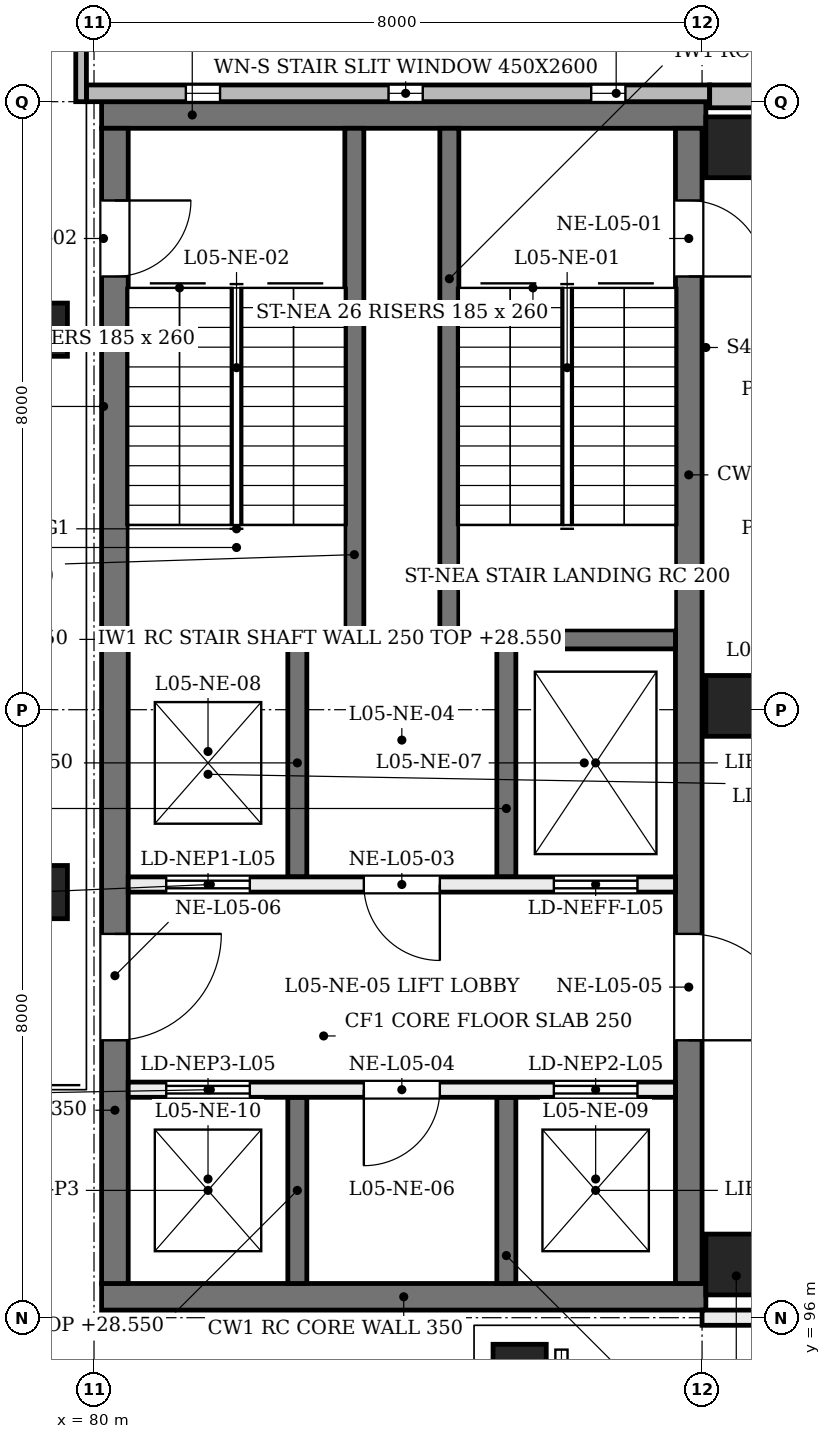
"""IFC4 building model, lengths in metres.
Left out: names, types, materials, properties, quantities, classifications, styles, units other than length and angle.
Written with IfcOpenShell. Run it as: python <this file> out.ifc"""

import sys

from ifc_helpers import new_model, si_unit, direction, frame, frame_2d, origin, origin_2d, place, context, subcontext, project, spatial, rectangle, extrude, element, fill, save


model = new_model("IFC4")
c1 = context("Model", 3, precision=1e-05, world=origin(), true_north=direction((0.0, 1.0)))
c2 = subcontext(c1, "Body", "Model", "MODEL_VIEW")
j1 = project(units=[si_unit("LENGTHUNIT", "METRE"), si_unit("PLANEANGLEUNIT", "RADIAN")], contexts=[c1])
p1 = place(None, origin())
s1 = spatial("IfcSite", under=j1, at=p1, CompositionType="ELEMENT")
p2 = place(p1, origin())
s2 = spatial("IfcBuilding", under=s1, at=p2, CompositionType="ELEMENT")
p3 = place(p2, frame((0.0, 0.0, 24.0)))
s3 = spatial("IfcBuildingStorey", under=s2, at=p3, CompositionType="ELEMENT", Elevation=24.0)
for number, where, z_axis, x_axis in (
    (1, (80.1, 96.275, 0.0), (0.0, 0.0, 1.0), (1.0, 0.0, 0.0)),
    (2, (80.1, 111.825, 0.0), (0.0, 0.0, 1.0), (1.0, 0.0, 0.0)),
):
    element("IfcWall", number, at=place(p3, frame(where, z_axis=z_axis, x_axis=x_axis)), inside=s3, PredefinedType="SHEAR", context=c2, shape_type="SweptSolid", body=[
        extrude(rectangle(XDim=7.95, YDim=0.35, at=frame_2d((3.975, 0.0))), origin(), (0.0, 0.0, 1.0), 4.58),
    ])
p4 = place(p3, frame((80.275, 96.45, 0.0), z_axis=(0.0, 0.0, 1.0), x_axis=(0.0, 1.0, 0.0)))
e3 = element("IfcWall", 3, at=p4, inside=s3, PredefinedType="SHEAR", context=c2, shape_type="SweptSolid", body=[
    extrude(rectangle(XDim=15.2, YDim=0.35, at=frame_2d((7.6, 0.0))), origin(), (0.0, 0.0, 1.0), 4.58),
])
p5 = place(p4, frame((13.25, 0.0, 0.0)))
e4 = element("IfcOpeningElement", 4, at=p5, cuts=e3, PredefinedType="OPENING", context=c2, shape_type="SweptSolid", body=[
    extrude(rectangle(XDim=1.0, YDim=2.1, at=frame_2d((0.5, 1.05))), frame((0.0, 0.185, 0.0), z_axis=(0.0, -1.0, 0.0), x_axis=(1.0, 0.0, 0.0)), (0.0, 0.0, 1.0), 0.37),
])
p6 = place(p4, frame((3.2, 0.0, 0.0)))
e5 = element("IfcOpeningElement", 5, at=p6, cuts=e3, PredefinedType="OPENING", context=c2, shape_type="SweptSolid", body=[
    extrude(rectangle(XDim=1.4, YDim=2.1, at=frame_2d((0.7, 1.05))), frame((0.0, 0.185, 0.0), z_axis=(0.0, -1.0, 0.0), x_axis=(1.0, 0.0, 0.0)), (0.0, 0.0, 1.0), 0.37),
])
p7 = place(p3, frame((87.825, 96.45, 0.0), z_axis=(0.0, 0.0, 1.0), x_axis=(0.0, 1.0, 0.0)))
e6 = element("IfcWall", 6, at=p7, inside=s3, PredefinedType="SHEAR", context=c2, shape_type="SweptSolid", body=[
    extrude(rectangle(XDim=15.2, YDim=0.35, at=frame_2d((7.6, 0.0))), origin(), (0.0, 0.0, 1.0), 4.58),
])
p8 = place(p7, frame((13.25, 0.0, 0.0)))
e7 = element("IfcOpeningElement", 7, at=p8, cuts=e6, PredefinedType="OPENING", context=c2, shape_type="SweptSolid", body=[
    extrude(rectangle(XDim=1.0, YDim=2.1, at=frame_2d((0.5, 1.05))), frame((0.0, 0.185, 0.0), z_axis=(0.0, -1.0, 0.0), x_axis=(1.0, 0.0, 0.0)), (0.0, 0.0, 1.0), 0.37),
])
p9 = place(p7, frame((3.2, 0.0, 0.0)))
e8 = element("IfcOpeningElement", 8, at=p9, cuts=e6, PredefinedType="OPENING", context=c2, shape_type="SweptSolid", body=[
    extrude(rectangle(XDim=1.4, YDim=2.1, at=frame_2d((0.7, 1.05))), frame((0.0, 0.185, 0.0), z_axis=(0.0, -1.0, 0.0), x_axis=(1.0, 0.0, 0.0)), (0.0, 0.0, 1.0), 0.37),
])
for number, where, z_axis, x_axis in (
    (9, (88.45, 96.7, 0.0), (0.0, 0.0, 1.0), (1.0, 0.0, 0.0)),
    (10, (88.45, 104.05, 0.0), (0.0, 0.0, 1.0), (1.0, 0.0, 0.0)),
    (11, (88.45, 111.4, 0.0), (0.0, 0.0, 1.0), (1.0, 0.0, 0.0)),
):
    element("IfcColumn", number, at=place(p3, frame(where, z_axis=z_axis, x_axis=x_axis)), inside=s3, PredefinedType="COLUMN", context=c2, shape_type="SweptSolid", body=[
        extrude(rectangle(XDim=0.8, YDim=0.8, at=origin_2d()), origin(), (0.0, 0.0, 1.0), 4.58),
    ])
for number, where, z_axis, x_axis in (
    (12, (79.3, 101.6, 0.0), (0.0, 0.0, 1.0), (1.0, 0.0, 0.0)),
    (13, (79.3, 109.0, 0.0), (0.0, 0.0, 1.0), (1.0, 0.0, 0.0)),
    (14, (85.6, 95.3, 0.0), (0.0, 0.0, 1.0), (1.0, 0.0, 0.0)),
):
    element("IfcColumn", number, at=place(p3, frame(where, z_axis=z_axis, x_axis=x_axis)), inside=s3, PredefinedType="COLUMN", context=c2, shape_type="SweptSolid", body=[
        extrude(rectangle(XDim=0.7, YDim=0.7, at=origin_2d()), origin(), (0.0, 0.0, 1.0), 4.58),
    ])
p10 = place(p3, frame((79.9, 112.11, 0.0), z_axis=(0.0, 0.0, 1.0), x_axis=(1.0, 0.0, 0.0)))
e15 = element("IfcWall", 15, at=p10, inside=s3, PredefinedType="SOLIDWALL", context=c2, shape_type="SweptSolid", body=[
    extrude(rectangle(XDim=8.2, YDim=0.22, at=frame_2d((4.1, 0.0))), origin(), (0.0, 0.0, 1.0), 3.9),
])
p11 = place(p10, frame((1.308, 0.0, 0.9)))
e16 = element("IfcOpeningElement", 16, at=p11, cuts=e15, PredefinedType="OPENING", context=c2, shape_type="SweptSolid", body=[
    extrude(rectangle(XDim=0.45, YDim=2.6, at=frame_2d((0.225, 1.3))), frame((0.0, 0.12, 0.0), z_axis=(0.0, -1.0, 0.0), x_axis=(1.0, 0.0, 0.0)), (0.0, 0.0, 1.0), 0.24),
])
p12 = place(p10, frame((3.975, 0.0, 0.9)))
e17 = element("IfcOpeningElement", 17, at=p12, cuts=e15, PredefinedType="OPENING", context=c2, shape_type="SweptSolid", body=[
    extrude(rectangle(XDim=0.45, YDim=2.6, at=frame_2d((0.225, 1.3))), frame((0.0, 0.12, 0.0), z_axis=(0.0, -1.0, 0.0), x_axis=(1.0, 0.0, 0.0)), (0.0, 0.0, 1.0), 0.24),
])
p13 = place(p10, frame((6.642, 0.0, 0.9)))
e18 = element("IfcOpeningElement", 18, at=p13, cuts=e15, PredefinedType="OPENING", context=c2, shape_type="SweptSolid", body=[
    extrude(rectangle(XDim=0.45, YDim=2.6, at=frame_2d((0.225, 1.3))), frame((0.0, 0.12, 0.0), z_axis=(0.0, -1.0, 0.0), x_axis=(1.0, 0.0, 0.0)), (0.0, 0.0, 1.0), 0.24),
])
p14 = place(p3, frame((88.1, 112.07, 0.0), z_axis=(0.0, 0.0, 1.0), x_axis=(1.0, 0.0, 0.0)))
e19 = element("IfcWall", 19, at=p14, inside=s3, PredefinedType="SOLIDWALL", context=c2, shape_type="SweptSolid", body=[
    extrude(rectangle(XDim=7.9, YDim=0.3, at=frame_2d((3.95, 0.0))), origin(), (0.0, 0.0, 1.0), 3.9),
])
p15 = place(p14, frame((0.717, 0.0, 1.0)))
e20 = element("IfcOpeningElement", 20, at=p15, cuts=e19, PredefinedType="OPENING", context=c2, shape_type="SweptSolid", body=[
    extrude(rectangle(XDim=1.2, YDim=2.4, at=frame_2d((0.6, 1.2))), frame((0.0, 0.16, 0.0), z_axis=(0.0, -1.0, 0.0), x_axis=(1.0, 0.0, 0.0)), (0.0, 0.0, 1.0), 0.32),
])
p16 = place(p14, frame((3.35, 0.0, 1.0)))
e21 = element("IfcOpeningElement", 21, at=p16, cuts=e19, PredefinedType="OPENING", context=c2, shape_type="SweptSolid", body=[
    extrude(rectangle(XDim=1.2, YDim=2.4, at=frame_2d((0.6, 1.2))), frame((0.0, 0.16, 0.0), z_axis=(0.0, -1.0, 0.0), x_axis=(1.0, 0.0, 0.0)), (0.0, 0.0, 1.0), 0.32),
])
p17 = place(p14, frame((5.983, 0.0, 1.0)))
e22 = element("IfcOpeningElement", 22, at=p17, cuts=e19, PredefinedType="OPENING", context=c2, shape_type="SweptSolid", body=[
    extrude(rectangle(XDim=1.2, YDim=2.4, at=frame_2d((0.6, 1.2))), frame((0.0, 0.16, 0.0), z_axis=(0.0, -1.0, 0.0), x_axis=(1.0, 0.0, 0.0)), (0.0, 0.0, 1.0), 0.32),
])
p18 = place(p3, frame((79.83, 112.0, 0.0), z_axis=(0.0, 0.0, 1.0), x_axis=(0.0, 1.0, 0.0)))
e23 = element("IfcWall", 23, at=p18, inside=s3, PredefinedType="SOLIDWALL", context=c2, shape_type="SweptSolid", body=[
    extrude(rectangle(XDim=5.0, YDim=0.14, at=frame_2d((2.5, 0.0))), origin(), (0.0, 0.0, 1.0), 3.9),
])
for number, where, z_axis, x_axis in (
    (24, (84.675, 111.65, 0.0), (0.0, 0.0, 1.0), (0.0, -1.0, 0.0)),
    (25, (83.425, 111.65, 0.0), (0.0, 0.0, 1.0), (0.0, -1.0, 0.0)),
):
    element("IfcWall", number, at=place(p3, frame(where, z_axis=z_axis, x_axis=x_axis)), inside=s3, PredefinedType="SOLIDWALL", context=c2, shape_type="SweptSolid", body=[
        extrude(rectangle(XDim=6.6, YDim=0.25, at=frame_2d((3.3, 0.0))), origin(), (0.0, 0.0, 1.0), 4.55),
    ])
p19 = place(p3, frame((87.65, 104.925, 0.0), z_axis=(0.0, 0.0, 1.0), x_axis=(-1.0, 0.0, 0.0)))
e26 = element("IfcWall", 26, at=p19, inside=s3, PredefinedType="SOLIDWALL", context=c2, shape_type="SweptSolid", body=[
    extrude(rectangle(XDim=3.1, YDim=0.25, at=frame_2d((1.55, 0.0))), origin(), (0.0, 0.0, 1.0), 4.55),
])
p20 = place(p3, frame((83.55, 104.925, 0.0), z_axis=(0.0, 0.0, 1.0), x_axis=(-1.0, 0.0, 0.0)))
e27 = element("IfcWall", 27, at=p20, inside=s3, PredefinedType="SOLIDWALL", context=c2, shape_type="SweptSolid", body=[
    extrude(rectangle(XDim=3.1, YDim=0.25, at=frame_2d((1.55, 0.0))), origin(), (0.0, 0.0, 1.0), 4.55),
])
p21 = place(p3, frame((85.425, 104.8, 0.0), z_axis=(0.0, 0.0, 1.0), x_axis=(0.0, -1.0, 0.0)))
e28 = element("IfcWall", 28, at=p21, inside=s3, PredefinedType="SOLIDWALL", context=c2, shape_type="SweptSolid", body=[
    extrude(rectangle(XDim=3.0, YDim=0.25, at=frame_2d((1.5, 0.0))), origin(), (0.0, 0.0, 1.0), 4.55),
])
p22 = place(p3, frame((85.425, 98.9, 0.0), z_axis=(0.0, 0.0, 1.0), x_axis=(0.0, -1.0, 0.0)))
e29 = element("IfcWall", 29, at=p22, inside=s3, PredefinedType="SOLIDWALL", context=c2, shape_type="SweptSolid", body=[
    extrude(rectangle(XDim=2.45, YDim=0.25, at=frame_2d((1.225, 0.0))), origin(), (0.0, 0.0, 1.0), 4.55),
])
p23 = place(p3, frame((82.675, 104.8, 0.0), z_axis=(0.0, 0.0, 1.0), x_axis=(0.0, -1.0, 0.0)))
e30 = element("IfcWall", 30, at=p23, inside=s3, PredefinedType="SOLIDWALL", context=c2, shape_type="SweptSolid", body=[
    extrude(rectangle(XDim=3.0, YDim=0.25, at=frame_2d((1.5, 0.0))), origin(), (0.0, 0.0, 1.0), 4.55),
])
p24 = place(p3, frame((82.675, 98.9, 0.0), z_axis=(0.0, 0.0, 1.0), x_axis=(0.0, -1.0, 0.0)))
e31 = element("IfcWall", 31, at=p24, inside=s3, PredefinedType="SOLIDWALL", context=c2, shape_type="SweptSolid", body=[
    extrude(rectangle(XDim=2.45, YDim=0.25, at=frame_2d((1.225, 0.0))), origin(), (0.0, 0.0, 1.0), 4.55),
])
p25 = place(p3, frame((87.65, 101.7, 0.0), z_axis=(0.0, 0.0, 1.0), x_axis=(-1.0, 0.0, 0.0)))
e32 = element("IfcWall", 32, at=p25, inside=s3, PredefinedType="SOLIDWALL", context=c2, shape_type="SweptSolid", body=[
    extrude(rectangle(XDim=7.2, YDim=0.2, at=frame_2d((3.6, 0.0))), origin(), (0.0, 0.0, 1.0), 4.55),
])
p26 = place(p25, frame((0.5, 0.0, 0.0)))
e33 = element("IfcOpeningElement", 33, at=p26, cuts=e32, PredefinedType="OPENING", context=c2, shape_type="SweptSolid", body=[
    extrude(rectangle(XDim=1.1, YDim=2.1, at=frame_2d((0.55, 1.05))), frame((0.0, 0.11, 0.0), z_axis=(0.0, -1.0, 0.0), x_axis=(1.0, 0.0, 0.0)), (0.0, 0.0, 1.0), 0.22),
])
p27 = place(p25, frame((5.6, 0.0, 0.0)))
e34 = element("IfcOpeningElement", 34, at=p27, cuts=e32, PredefinedType="OPENING", context=c2, shape_type="SweptSolid", body=[
    extrude(rectangle(XDim=1.1, YDim=2.1, at=frame_2d((0.55, 1.05))), frame((0.0, 0.11, 0.0), z_axis=(0.0, -1.0, 0.0), x_axis=(1.0, 0.0, 0.0)), (0.0, 0.0, 1.0), 0.22),
])
p28 = place(p25, frame((3.1, 0.0, 0.0)))
e35 = element("IfcOpeningElement", 35, at=p28, cuts=e32, PredefinedType="OPENING", context=c2, shape_type="SweptSolid", body=[
    extrude(rectangle(XDim=1.0, YDim=2.1, at=frame_2d((0.5, 1.05))), frame((0.0, 0.11, 0.0), z_axis=(0.0, -1.0, 0.0), x_axis=(1.0, 0.0, 0.0)), (0.0, 0.0, 1.0), 0.22),
])
p29 = place(p3, frame((87.65, 99.0, 0.0), z_axis=(0.0, 0.0, 1.0), x_axis=(-1.0, 0.0, 0.0)))
e36 = element("IfcWall", 36, at=p29, inside=s3, PredefinedType="SOLIDWALL", context=c2, shape_type="SweptSolid", body=[
    extrude(rectangle(XDim=7.2, YDim=0.2, at=frame_2d((3.6, 0.0))), origin(), (0.0, 0.0, 1.0), 4.55),
])
p30 = place(p29, frame((0.5, 0.0, 0.0)))
e37 = element("IfcOpeningElement", 37, at=p30, cuts=e36, PredefinedType="OPENING", context=c2, shape_type="SweptSolid", body=[
    extrude(rectangle(XDim=1.1, YDim=2.1, at=frame_2d((0.55, 1.05))), frame((0.0, 0.11, 0.0), z_axis=(0.0, -1.0, 0.0), x_axis=(1.0, 0.0, 0.0)), (0.0, 0.0, 1.0), 0.22),
])
p31 = place(p29, frame((5.6, 0.0, 0.0)))
e38 = element("IfcOpeningElement", 38, at=p31, cuts=e36, PredefinedType="OPENING", context=c2, shape_type="SweptSolid", body=[
    extrude(rectangle(XDim=1.1, YDim=2.1, at=frame_2d((0.55, 1.05))), frame((0.0, 0.11, 0.0), z_axis=(0.0, -1.0, 0.0), x_axis=(1.0, 0.0, 0.0)), (0.0, 0.0, 1.0), 0.22),
])
p32 = place(p29, frame((3.1, 0.0, 0.0)))
e39 = element("IfcOpeningElement", 39, at=p32, cuts=e36, PredefinedType="OPENING", context=c2, shape_type="SweptSolid", body=[
    extrude(rectangle(XDim=1.0, YDim=2.1, at=frame_2d((0.5, 1.05))), frame((0.0, 0.11, 0.0), z_axis=(0.0, -1.0, 0.0), x_axis=(1.0, 0.0, 0.0)), (0.0, 0.0, 1.0), 0.22),
])
p33 = place(p3, frame((88.0, 96.0, 0.0), z_axis=(0.0, 0.0, 1.0), x_axis=(1.0, 0.0, 0.0)))
e40 = element("IfcWall", 40, at=p33, inside=s3, PredefinedType="PARTITIONING", context=c2, shape_type="SweptSolid", body=[
    extrude(rectangle(XDim=3.6, YDim=0.2, at=frame_2d((1.8, 0.0))), origin(), (0.0, 0.0, 1.0), 3.88),
])
p34 = place(p33, frame((1.0, 0.0, 0.0)))
e41 = element("IfcOpeningElement", 41, at=p34, cuts=e40, PredefinedType="OPENING", context=c2, shape_type="SweptSolid", body=[
    extrude(rectangle(XDim=1.6, YDim=2.1, at=frame_2d((0.8, 1.05))), frame((0.0, 0.11, 0.0), z_axis=(0.0, -1.0, 0.0), x_axis=(1.0, 0.0, 0.0)), (0.0, 0.0, 1.0), 0.22),
])
p35 = place(p11, origin())
e42 = element("IfcWindow", 42, at=p35, inside=s3, PartitioningType="SINGLE_PANEL", PredefinedType="WINDOW", context=c2, shape_type="SweptSolid", body=[
    extrude(rectangle(XDim=0.45, YDim=2.6, at=frame_2d((0.225, 1.3))), frame((0.0, 0.03, 0.0), z_axis=(0.0, -1.0, 0.0), x_axis=(1.0, 0.0, 0.0)), (0.0, 0.0, 1.0), 0.06),
])
fill(e16, e42)
p36 = place(p12, origin())
e43 = element("IfcWindow", 43, at=p36, inside=s3, PartitioningType="SINGLE_PANEL", PredefinedType="WINDOW", context=c2, shape_type="SweptSolid", body=[
    extrude(rectangle(XDim=0.45, YDim=2.6, at=frame_2d((0.225, 1.3))), frame((0.0, 0.03, 0.0), z_axis=(0.0, -1.0, 0.0), x_axis=(1.0, 0.0, 0.0)), (0.0, 0.0, 1.0), 0.06),
])
fill(e17, e43)
p37 = place(p13, origin())
e44 = element("IfcWindow", 44, at=p37, inside=s3, PartitioningType="SINGLE_PANEL", PredefinedType="WINDOW", context=c2, shape_type="SweptSolid", body=[
    extrude(rectangle(XDim=0.45, YDim=2.6, at=frame_2d((0.225, 1.3))), frame((0.0, 0.03, 0.0), z_axis=(0.0, -1.0, 0.0), x_axis=(1.0, 0.0, 0.0)), (0.0, 0.0, 1.0), 0.06),
])
fill(e18, e44)
p38 = place(p8, frame((1.0, 0.0, 0.0), z_axis=(0.0, 0.0, 1.0), x_axis=(-1.0, 0.0, 0.0)))
e45 = element("IfcDoor", 45, at=p38, inside=s3, OperationType="SINGLE_SWING_LEFT", PredefinedType="DOOR", context=c2, shape_type="SweptSolid", body=[
    extrude(rectangle(XDim=1.0, YDim=2.1, at=frame_2d((0.5, 1.05))), frame((0.0, 0.025, 0.0), z_axis=(0.0, -1.0, 0.0), x_axis=(1.0, 0.0, 0.0)), (0.0, 0.0, 1.0), 0.05),
])
fill(e7, e45)
p39 = place(p5, origin())
e46 = element("IfcDoor", 46, at=p39, inside=s3, OperationType="SINGLE_SWING_RIGHT", PredefinedType="DOOR", context=c2, shape_type="SweptSolid", body=[
    extrude(rectangle(XDim=1.0, YDim=2.1, at=frame_2d((0.5, 1.05))), frame((0.0, 0.025, 0.0), z_axis=(0.0, -1.0, 0.0), x_axis=(1.0, 0.0, 0.0)), (0.0, 0.0, 1.0), 0.05),
])
fill(e4, e46)
p40 = place(p26, origin())
e47 = element("IfcDoor", 47, at=p40, inside=s3, OperationType="DOUBLE_DOOR_SLIDING", PredefinedType="DOOR", context=c2, shape_type="SweptSolid", body=[
    extrude(rectangle(XDim=1.1, YDim=2.1, at=frame_2d((0.55, 1.05))), frame((0.0, 0.025, 0.0), z_axis=(0.0, -1.0, 0.0), x_axis=(1.0, 0.0, 0.0)), (0.0, 0.0, 1.0), 0.05),
])
fill(e33, e47)
p41 = place(p27, origin())
e48 = element("IfcDoor", 48, at=p41, inside=s3, OperationType="DOUBLE_DOOR_SLIDING", PredefinedType="DOOR", context=c2, shape_type="SweptSolid", body=[
    extrude(rectangle(XDim=1.1, YDim=2.1, at=frame_2d((0.55, 1.05))), frame((0.0, 0.025, 0.0), z_axis=(0.0, -1.0, 0.0), x_axis=(1.0, 0.0, 0.0)), (0.0, 0.0, 1.0), 0.05),
])
fill(e34, e48)
p42 = place(p30, frame((1.1, 0.0, 0.0), z_axis=(0.0, 0.0, 1.0), x_axis=(-1.0, 0.0, 0.0)))
e49 = element("IfcDoor", 49, at=p42, inside=s3, OperationType="DOUBLE_DOOR_SLIDING", PredefinedType="DOOR", context=c2, shape_type="SweptSolid", body=[
    extrude(rectangle(XDim=1.1, YDim=2.1, at=frame_2d((0.55, 1.05))), frame((0.0, 0.025, 0.0), z_axis=(0.0, -1.0, 0.0), x_axis=(1.0, 0.0, 0.0)), (0.0, 0.0, 1.0), 0.05),
])
fill(e37, e49)
p43 = place(p31, frame((1.1, 0.0, 0.0), z_axis=(0.0, 0.0, 1.0), x_axis=(-1.0, 0.0, 0.0)))
e50 = element("IfcDoor", 50, at=p43, inside=s3, OperationType="DOUBLE_DOOR_SLIDING", PredefinedType="DOOR", context=c2, shape_type="SweptSolid", body=[
    extrude(rectangle(XDim=1.1, YDim=2.1, at=frame_2d((0.55, 1.05))), frame((0.0, 0.025, 0.0), z_axis=(0.0, -1.0, 0.0), x_axis=(1.0, 0.0, 0.0)), (0.0, 0.0, 1.0), 0.05),
])
fill(e38, e50)
p44 = place(p28, origin())
e51 = element("IfcDoor", 51, at=p44, inside=s3, OperationType="SINGLE_SWING_LEFT", PredefinedType="DOOR", context=c2, shape_type="SweptSolid", body=[
    extrude(rectangle(XDim=1.0, YDim=2.1, at=frame_2d((0.5, 1.05))), frame((0.0, 0.025, 0.0), z_axis=(0.0, -1.0, 0.0), x_axis=(1.0, 0.0, 0.0)), (0.0, 0.0, 1.0), 0.05),
])
fill(e35, e51)
p45 = place(p32, frame((1.0, 0.0, 0.0), z_axis=(0.0, 0.0, 1.0), x_axis=(-1.0, 0.0, 0.0)))
e52 = element("IfcDoor", 52, at=p45, inside=s3, OperationType="SINGLE_SWING_RIGHT", PredefinedType="DOOR", context=c2, shape_type="SweptSolid", body=[
    extrude(rectangle(XDim=1.0, YDim=2.1, at=frame_2d((0.5, 1.05))), frame((0.0, 0.025, 0.0), z_axis=(0.0, -1.0, 0.0), x_axis=(1.0, 0.0, 0.0)), (0.0, 0.0, 1.0), 0.05),
])
fill(e39, e52)
p46 = place(p9, frame((1.4, 0.0, 0.0), z_axis=(0.0, 0.0, 1.0), x_axis=(-1.0, 0.0, 0.0)))
e53 = element("IfcDoor", 53, at=p46, inside=s3, OperationType="SINGLE_SWING_LEFT", PredefinedType="DOOR", context=c2, shape_type="SweptSolid", body=[
    extrude(rectangle(XDim=1.4, YDim=2.1, at=frame_2d((0.7, 1.05))), frame((0.0, 0.025, 0.0), z_axis=(0.0, -1.0, 0.0), x_axis=(1.0, 0.0, 0.0)), (0.0, 0.0, 1.0), 0.05),
])
fill(e8, e53)
p47 = place(p6, origin())
e54 = element("IfcDoor", 54, at=p47, inside=s3, OperationType="SINGLE_SWING_RIGHT", PredefinedType="DOOR", context=c2, shape_type="SweptSolid", body=[
    extrude(rectangle(XDim=1.4, YDim=2.1, at=frame_2d((0.7, 1.05))), frame((0.0, 0.025, 0.0), z_axis=(0.0, -1.0, 0.0), x_axis=(1.0, 0.0, 0.0)), (0.0, 0.0, 1.0), 0.05),
])
fill(e5, e54)
save(model, sys.argv[1])
